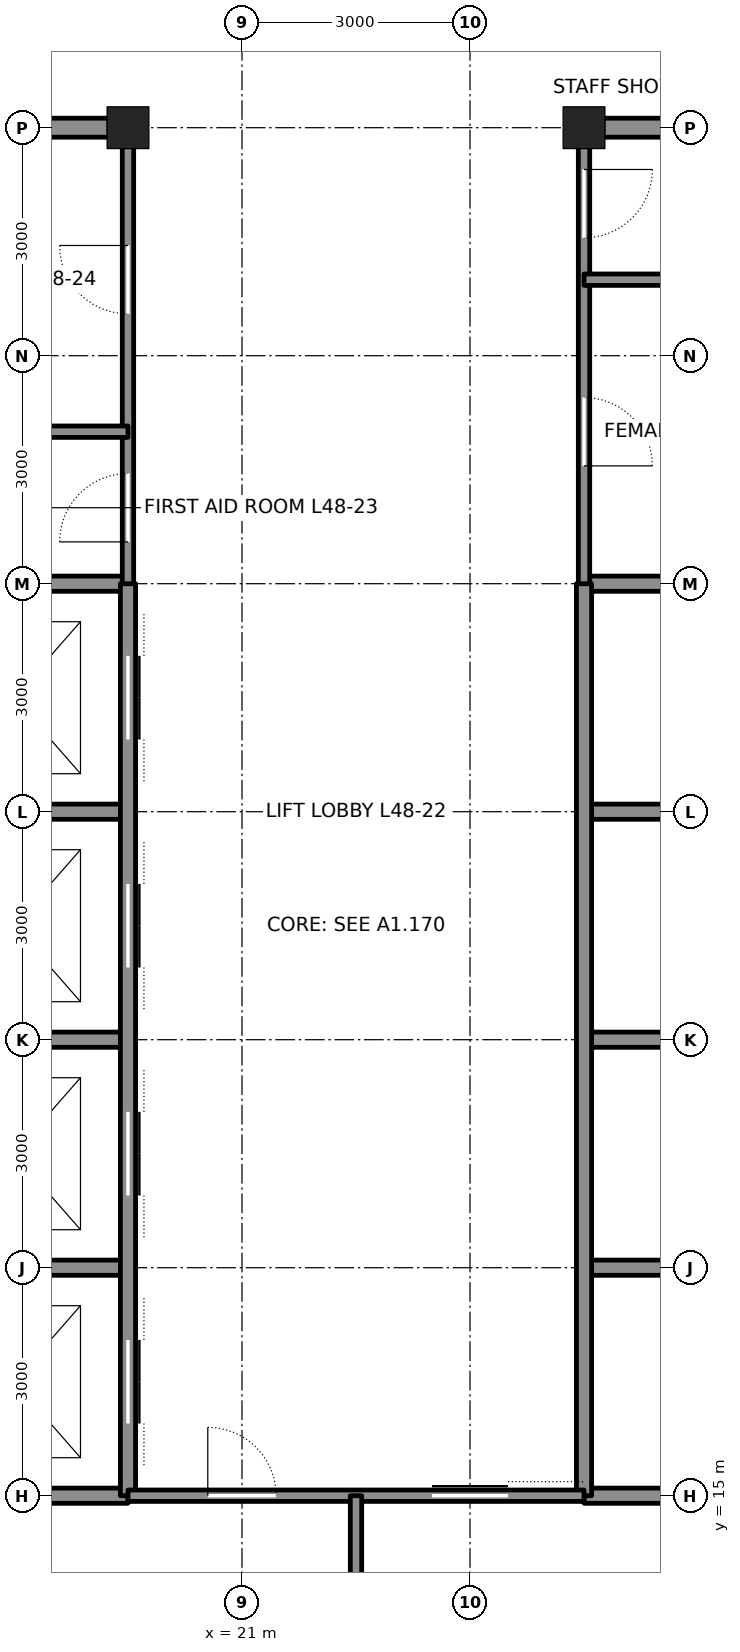
"""IFC4 building model, lengths in metres.
Left out: names, types, materials, properties, quantities, classifications, styles, units other than length and angle.
Written with IfcOpenShell. Run it as: python <this file> out.ifc"""

import sys

from ifc_helpers import new_model, si_unit, direction, frame, frame_2d, origin, origin_2d, place, context, subcontext, project, spatial, rectangle, hollow_rectangle, extrude, element, fill, save


model = new_model("IFC4")
c1 = context("Model", 3, precision=1e-05, world=origin(), true_north=direction((0.0, 1.0)))
c2 = subcontext(c1, "Body", "Model", "MODEL_VIEW")
j1 = project(units=[si_unit("LENGTHUNIT", "METRE"), si_unit("PLANEANGLEUNIT", "RADIAN")], contexts=[c1])
p1 = place(None, origin())
s1 = spatial("IfcSite", under=j1, at=p1, CompositionType="ELEMENT")
p2 = place(p1, origin())
s2 = spatial("IfcBuilding", under=s1, at=p2, CompositionType="ELEMENT")
p3 = place(p2, frame((0.0, 0.0, 218.1)))
s3 = spatial("IfcBuildingStorey", under=s2, at=p3, CompositionType="ELEMENT", Elevation=218.1)
for number, where, z_axis, x_axis in (
    (1, (19.5, 33.0, 0.0), (0.0, 0.0, 1.0), (1.0, 0.0, 0.0)),
    (2, (25.5, 33.0, 0.0), (0.0, 0.0, 1.0), (1.0, 0.0, 0.0)),
):
    element("IfcColumn", number, at=place(p3, frame(where, z_axis=z_axis, x_axis=x_axis)), inside=s3, PredefinedType="COLUMN", context=c2, shape_type="SweptSolid", body=[
        extrude(hollow_rectangle(XDim=0.55, YDim=0.55, WallThickness=0.045, at=origin_2d()), origin(), (0.0, 0.0, 1.0), 4.2),
    ])
for number, where, z_axis, x_axis in (
    (3, (12.0, 15.0, 0.0), (0.0, 0.0, 1.0), (1.0, 0.0, 0.0)),
    (4, (25.5, 15.0, 0.0), (0.0, 0.0, 1.0), (1.0, 0.0, 0.0)),
):
    element("IfcWall", number, at=place(p3, frame(where, z_axis=z_axis, x_axis=x_axis)), inside=s3, PredefinedType="SOLIDWALL", context=c2, shape_type="SweptSolid", body=[
        extrude(rectangle(XDim=7.5, YDim=0.2, at=frame_2d((3.75, 0.0))), origin(), (0.0, 0.0, 1.0), 4.04),
    ])
for number, where, z_axis, x_axis in (
    (5, (16.75, 24.0, 0.0), (0.0, 0.0, 1.0), (1.0, 0.0, 0.0)),
    (6, (25.5, 24.0, 0.0), (0.0, 0.0, 1.0), (1.0, 0.0, 0.0)),
):
    element("IfcWall", number, at=place(p3, frame(where, z_axis=z_axis, x_axis=x_axis)), inside=s3, PredefinedType="SOLIDWALL", context=c2, shape_type="SweptSolid", body=[
        extrude(rectangle(XDim=2.75, YDim=0.2, at=frame_2d((1.375, 0.0))), origin(), (0.0, 0.0, 1.0), 3.09),
    ])
p4 = place(p3, frame((12.0, 27.0, 0.0), z_axis=(0.0, 0.0, 1.0), x_axis=(1.0, 0.0, 0.0)))
e7 = element("IfcWall", 7, at=p4, inside=s3, PredefinedType="SOLIDWALL", context=c2, shape_type="SweptSolid", body=[
    extrude(rectangle(XDim=7.5, YDim=0.2, at=frame_2d((3.75, 0.0))), origin(), (0.0, 0.0, 1.0), 4.04),
])
p5 = place(p4, frame((1.65, 0.0, 0.0)))
e8 = element("IfcOpeningElement", 8, at=p5, cuts=e7, PredefinedType="OPENING", context=c2, shape_type="SweptSolid", body=[
    extrude(rectangle(XDim=1.2, YDim=2.1, at=frame_2d((0.6, 1.05))), frame((0.0, 0.11, 0.0), z_axis=(0.0, -1.0, 0.0), x_axis=(1.0, 0.0, 0.0)), (0.0, 0.0, 1.0), 0.22),
])
p6 = place(p3, frame((25.5, 27.0, 0.0), z_axis=(0.0, 0.0, 1.0), x_axis=(1.0, 0.0, 0.0)))
e9 = element("IfcWall", 9, at=p6, inside=s3, PredefinedType="SOLIDWALL", context=c2, shape_type="SweptSolid", body=[
    extrude(rectangle(XDim=3.0, YDim=0.2, at=frame_2d((1.5, 0.0))), origin(), (0.0, 0.0, 1.0), 4.04),
])
for number, where, z_axis, x_axis in (
    (10, (16.75, 33.0, 0.0), (0.0, 0.0, 1.0), (1.0, 0.0, 0.0)),
    (11, (25.75, 33.0, 0.0), (0.0, 0.0, 1.0), (1.0, 0.0, 0.0)),
):
    element("IfcWall", number, at=place(p3, frame(where, z_axis=z_axis, x_axis=x_axis)), inside=s3, PredefinedType="SOLIDWALL", context=c2, shape_type="SweptSolid", body=[
        extrude(rectangle(XDim=2.5, YDim=0.25, at=frame_2d((1.25, 0.0))), origin(), (0.0, 0.0, 1.0), 3.181),
    ])
p7 = place(p3, frame((16.5, 18.0, 0.0), z_axis=(0.0, 0.0, 1.0), x_axis=(1.0, 0.0, 0.0)))
e12 = element("IfcWall", 12, at=p7, inside=s3, PredefinedType="SOLIDWALL", context=c2, shape_type="SweptSolid", body=[
    extrude(rectangle(XDim=3.0, YDim=0.2, at=frame_2d((1.5, 0.0))), origin(), (0.0, 0.0, 1.0), 4.04),
])
p8 = place(p3, frame((25.5, 18.0, 0.0), z_axis=(0.0, 0.0, 1.0), x_axis=(1.0, 0.0, 0.0)))
e13 = element("IfcWall", 13, at=p8, inside=s3, PredefinedType="SOLIDWALL", context=c2, shape_type="SweptSolid", body=[
    extrude(rectangle(XDim=7.5, YDim=0.2, at=frame_2d((3.75, 0.0))), origin(), (0.0, 0.0, 1.0), 4.04),
])
p9 = place(p8, frame((4.65, 0.0, 0.0)))
e14 = element("IfcOpeningElement", 14, at=p9, cuts=e13, PredefinedType="OPENING", context=c2, shape_type="SweptSolid", body=[
    extrude(rectangle(XDim=1.2, YDim=2.1, at=frame_2d((0.6, 1.05))), frame((0.0, 0.11, 0.0), z_axis=(0.0, -1.0, 0.0), x_axis=(1.0, 0.0, 0.0)), (0.0, 0.0, 1.0), 0.22),
])
for number, where, z_axis, x_axis in (
    (15, (16.75, 21.0, 0.0), (0.0, 0.0, 1.0), (1.0, 0.0, 0.0)),
    (16, (25.5, 21.0, 0.0), (0.0, 0.0, 1.0), (1.0, 0.0, 0.0)),
):
    element("IfcWall", number, at=place(p3, frame(where, z_axis=z_axis, x_axis=x_axis)), inside=s3, PredefinedType="SOLIDWALL", context=c2, shape_type="SweptSolid", body=[
        extrude(rectangle(XDim=2.75, YDim=0.2, at=frame_2d((1.375, 0.0))), origin(), (0.0, 0.0, 1.0), 3.09),
    ])
p10 = place(p3, frame((19.5, 15.0, 0.0), z_axis=(0.0, 0.0, 1.0), x_axis=(0.0, 1.0, 0.0)))
e17 = element("IfcWall", 17, at=p10, inside=s3, PredefinedType="SOLIDWALL", context=c2, shape_type="SweptSolid", body=[
    extrude(rectangle(XDim=12.0, YDim=0.2, at=frame_2d((6.0, 0.0))), origin(), (0.0, 0.0, 1.0), 3.064),
])
p11 = place(p10, frame((0.95, 0.0, 0.0)))
e18 = element("IfcOpeningElement", 18, at=p11, cuts=e17, PredefinedType="OPENING", context=c2, shape_type="SweptSolid", body=[
    extrude(rectangle(XDim=1.1, YDim=2.1, at=frame_2d((0.55, 1.05))), frame((0.0, 0.11, 0.0), z_axis=(0.0, -1.0, 0.0), x_axis=(1.0, 0.0, 0.0)), (0.0, 0.0, 1.0), 0.22),
])
p12 = place(p10, frame((3.95, 0.0, 0.0)))
e19 = element("IfcOpeningElement", 19, at=p12, cuts=e17, PredefinedType="OPENING", context=c2, shape_type="SweptSolid", body=[
    extrude(rectangle(XDim=1.1, YDim=2.1, at=frame_2d((0.55, 1.05))), frame((0.0, 0.11, 0.0), z_axis=(0.0, -1.0, 0.0), x_axis=(1.0, 0.0, 0.0)), (0.0, 0.0, 1.0), 0.22),
])
p13 = place(p10, frame((6.95, 0.0, 0.0)))
e20 = element("IfcOpeningElement", 20, at=p13, cuts=e17, PredefinedType="OPENING", context=c2, shape_type="SweptSolid", body=[
    extrude(rectangle(XDim=1.1, YDim=2.1, at=frame_2d((0.55, 1.05))), frame((0.0, 0.11, 0.0), z_axis=(0.0, -1.0, 0.0), x_axis=(1.0, 0.0, 0.0)), (0.0, 0.0, 1.0), 0.22),
])
p14 = place(p10, frame((9.95, 0.0, 0.0)))
e21 = element("IfcOpeningElement", 21, at=p14, cuts=e17, PredefinedType="OPENING", context=c2, shape_type="SweptSolid", body=[
    extrude(rectangle(XDim=1.1, YDim=2.1, at=frame_2d((0.55, 1.05))), frame((0.0, 0.11, 0.0), z_axis=(0.0, -1.0, 0.0), x_axis=(1.0, 0.0, 0.0)), (0.0, 0.0, 1.0), 0.22),
])
p15 = place(p3, frame((19.5, 27.0, 0.0), z_axis=(0.0, 0.0, 1.0), x_axis=(0.0, 1.0, 0.0)))
e22 = element("IfcWall", 22, at=p15, inside=s3, PredefinedType="PARTITIONING", context=c2, shape_type="SweptSolid", body=[
    extrude(rectangle(XDim=5.75, YDim=0.15, at=frame_2d((2.875, 0.0))), origin(), (0.0, 0.0, 1.0), 3.064),
])
p16 = place(p15, frame((0.55, 0.0, 0.0)))
e23 = element("IfcOpeningElement", 23, at=p16, cuts=e22, PredefinedType="OPENING", context=c2, shape_type="SweptSolid", body=[
    extrude(rectangle(XDim=0.9, YDim=2.1, at=frame_2d((0.45, 1.05))), frame((0.0, 0.085, 0.0), z_axis=(0.0, -1.0, 0.0), x_axis=(1.0, 0.0, 0.0)), (0.0, 0.0, 1.0), 0.17),
])
p17 = place(p15, frame((3.55, 0.0, 0.0)))
e24 = element("IfcOpeningElement", 24, at=p17, cuts=e22, PredefinedType="OPENING", context=c2, shape_type="SweptSolid", body=[
    extrude(rectangle(XDim=0.9, YDim=2.1, at=frame_2d((0.45, 1.05))), frame((0.0, 0.085, 0.0), z_axis=(0.0, -1.0, 0.0), x_axis=(1.0, 0.0, 0.0)), (0.0, 0.0, 1.0), 0.17),
])
p18 = place(p3, frame((25.5, 15.0, 0.0), z_axis=(0.0, 0.0, 1.0), x_axis=(0.0, 1.0, 0.0)))
e25 = element("IfcWall", 25, at=p18, inside=s3, PredefinedType="SOLIDWALL", context=c2, shape_type="SweptSolid", body=[
    extrude(rectangle(XDim=12.0, YDim=0.2, at=frame_2d((6.0, 0.0))), origin(), (0.0, 0.0, 1.0), 3.064),
])
p19 = place(p3, frame((25.5, 27.0, 0.0), z_axis=(0.0, 0.0, 1.0), x_axis=(0.0, 1.0, 0.0)))
e26 = element("IfcWall", 26, at=p19, inside=s3, PredefinedType="PARTITIONING", context=c2, shape_type="SweptSolid", body=[
    extrude(rectangle(XDim=5.75, YDim=0.15, at=frame_2d((2.875, 0.0))), origin(), (0.0, 0.0, 1.0), 3.064),
])
p20 = place(p19, frame((1.55, 0.0, 0.0)))
e27 = element("IfcOpeningElement", 27, at=p20, cuts=e26, PredefinedType="OPENING", context=c2, shape_type="SweptSolid", body=[
    extrude(rectangle(XDim=0.9, YDim=2.1, at=frame_2d((0.45, 1.05))), frame((0.0, 0.085, 0.0), z_axis=(0.0, -1.0, 0.0), x_axis=(1.0, 0.0, 0.0)), (0.0, 0.0, 1.0), 0.17),
])
p21 = place(p19, frame((4.55, 0.0, 0.0)))
e28 = element("IfcOpeningElement", 28, at=p21, cuts=e26, PredefinedType="OPENING", context=c2, shape_type="SweptSolid", body=[
    extrude(rectangle(XDim=0.9, YDim=2.1, at=frame_2d((0.45, 1.05))), frame((0.0, 0.085, 0.0), z_axis=(0.0, -1.0, 0.0), x_axis=(1.0, 0.0, 0.0)), (0.0, 0.0, 1.0), 0.17),
])
p22 = place(p3, frame((19.5, 15.0, 0.0), z_axis=(0.0, 0.0, 1.0), x_axis=(1.0, 0.0, 0.0)))
e29 = element("IfcWall", 29, at=p22, inside=s3, PredefinedType="PARTITIONING", context=c2, shape_type="SweptSolid", body=[
    extrude(rectangle(XDim=6.0, YDim=0.15, at=frame_2d((3.0, 0.0))), origin(), (0.0, 0.0, 1.0), 4.04),
])
p23 = place(p22, frame((4.0, 0.0, 0.0)))
e30 = element("IfcOpeningElement", 30, at=p23, cuts=e29, PredefinedType="OPENING", context=c2, shape_type="SweptSolid", body=[
    extrude(rectangle(XDim=1.0, YDim=2.1, at=frame_2d((0.5, 1.05))), frame((0.0, 0.085, 0.0), z_axis=(0.0, -1.0, 0.0), x_axis=(1.0, 0.0, 0.0)), (0.0, 0.0, 1.0), 0.17),
])
p24 = place(p22, frame((1.05, 0.0, 0.0)))
e31 = element("IfcOpeningElement", 31, at=p24, cuts=e29, PredefinedType="OPENING", context=c2, shape_type="SweptSolid", body=[
    extrude(rectangle(XDim=0.9, YDim=2.1, at=frame_2d((0.45, 1.05))), frame((0.0, 0.085, 0.0), z_axis=(0.0, -1.0, 0.0), x_axis=(1.0, 0.0, 0.0)), (0.0, 0.0, 1.0), 0.17),
])
for number, where, z_axis, x_axis in (
    (32, (22.5, 15.0, 0.0), (0.0, 0.0, 1.0), (0.0, -1.0, 0.0)),
    (33, (16.5, 29.0, 0.0), (0.0, 0.0, 1.0), (1.0, 0.0, 0.0)),
    (34, (25.5, 31.0, 0.0), (0.0, 0.0, 1.0), (1.0, 0.0, 0.0)),
):
    element("IfcWall", number, at=place(p3, frame(where, z_axis=z_axis, x_axis=x_axis)), inside=s3, PredefinedType="PARTITIONING", context=c2, shape_type="SweptSolid", body=[
        extrude(rectangle(XDim=3.0, YDim=0.15, at=frame_2d((1.5, 0.0))), origin(), (0.0, 0.0, 1.0), 4.04),
    ])
p25 = place(p16, origin())
e35 = element("IfcDoor", 35, at=p25, inside=s3, OperationType="SINGLE_SWING_LEFT", PredefinedType="DOOR", context=c2, shape_type="SweptSolid", body=[
    extrude(rectangle(XDim=0.9, YDim=2.1, at=frame_2d((0.45, 1.05))), frame((0.0, 0.025, 0.0), z_axis=(0.0, -1.0, 0.0), x_axis=(1.0, 0.0, 0.0)), (0.0, 0.0, 1.0), 0.05),
])
fill(e23, e35)
p26 = place(p17, origin())
e36 = element("IfcDoor", 36, at=p26, inside=s3, OperationType="SINGLE_SWING_RIGHT", PredefinedType="DOOR", context=c2, shape_type="SweptSolid", body=[
    extrude(rectangle(XDim=0.9, YDim=2.1, at=frame_2d((0.45, 1.05))), frame((0.0, 0.025, 0.0), z_axis=(0.0, -1.0, 0.0), x_axis=(1.0, 0.0, 0.0)), (0.0, 0.0, 1.0), 0.05),
])
fill(e24, e36)
p27 = place(p20, frame((0.9, 0.0, 0.0), z_axis=(0.0, 0.0, 1.0), x_axis=(-1.0, 0.0, 0.0)))
e37 = element("IfcDoor", 37, at=p27, inside=s3, OperationType="SINGLE_SWING_RIGHT", PredefinedType="DOOR", context=c2, shape_type="SweptSolid", body=[
    extrude(rectangle(XDim=0.9, YDim=2.1, at=frame_2d((0.45, 1.05))), frame((0.0, 0.025, 0.0), z_axis=(0.0, -1.0, 0.0), x_axis=(1.0, 0.0, 0.0)), (0.0, 0.0, 1.0), 0.05),
])
fill(e27, e37)
p28 = place(p21, frame((0.9, 0.0, 0.0), z_axis=(0.0, 0.0, 1.0), x_axis=(-1.0, 0.0, 0.0)))
e38 = element("IfcDoor", 38, at=p28, inside=s3, OperationType="SINGLE_SWING_LEFT", PredefinedType="DOOR", context=c2, shape_type="SweptSolid", body=[
    extrude(rectangle(XDim=0.9, YDim=2.1, at=frame_2d((0.45, 1.05))), frame((0.0, 0.025, 0.0), z_axis=(0.0, -1.0, 0.0), x_axis=(1.0, 0.0, 0.0)), (0.0, 0.0, 1.0), 0.05),
])
fill(e28, e38)
p29 = place(p23, origin())
e39 = element("IfcDoor", 39, at=p29, inside=s3, OperationType="SLIDING_TO_LEFT", PredefinedType="DOOR", context=c2, shape_type="SweptSolid", body=[
    extrude(rectangle(XDim=1.0, YDim=2.1, at=frame_2d((0.5, 1.05))), frame((0.0, 0.025, 0.0), z_axis=(0.0, -1.0, 0.0), x_axis=(1.0, 0.0, 0.0)), (0.0, 0.0, 1.0), 0.05),
])
fill(e30, e39)
p30 = place(p24, origin())
e40 = element("IfcDoor", 40, at=p30, inside=s3, OperationType="SINGLE_SWING_LEFT", PredefinedType="DOOR", context=c2, shape_type="SweptSolid", body=[
    extrude(rectangle(XDim=0.9, YDim=2.1, at=frame_2d((0.45, 1.05))), frame((0.0, 0.025, 0.0), z_axis=(0.0, -1.0, 0.0), x_axis=(1.0, 0.0, 0.0)), (0.0, 0.0, 1.0), 0.05),
])
fill(e31, e40)
p31 = place(p11, origin())
e41 = element("IfcDoor", 41, at=p31, inside=s3, OperationType="DOUBLE_DOOR_SLIDING", PredefinedType="DOOR", context=c2, shape_type="SweptSolid", body=[
    extrude(rectangle(XDim=1.1, YDim=2.1, at=frame_2d((0.55, 1.05))), frame((0.0, 0.025, 0.0), z_axis=(0.0, -1.0, 0.0), x_axis=(1.0, 0.0, 0.0)), (0.0, 0.0, 1.0), 0.05),
])
fill(e18, e41)
p32 = place(p12, origin())
e42 = element("IfcDoor", 42, at=p32, inside=s3, OperationType="DOUBLE_DOOR_SLIDING", PredefinedType="DOOR", context=c2, shape_type="SweptSolid", body=[
    extrude(rectangle(XDim=1.1, YDim=2.1, at=frame_2d((0.55, 1.05))), frame((0.0, 0.025, 0.0), z_axis=(0.0, -1.0, 0.0), x_axis=(1.0, 0.0, 0.0)), (0.0, 0.0, 1.0), 0.05),
])
fill(e19, e42)
p33 = place(p13, origin())
e43 = element("IfcDoor", 43, at=p33, inside=s3, OperationType="DOUBLE_DOOR_SLIDING", PredefinedType="DOOR", context=c2, shape_type="SweptSolid", body=[
    extrude(rectangle(XDim=1.1, YDim=2.1, at=frame_2d((0.55, 1.05))), frame((0.0, 0.025, 0.0), z_axis=(0.0, -1.0, 0.0), x_axis=(1.0, 0.0, 0.0)), (0.0, 0.0, 1.0), 0.05),
])
fill(e20, e43)
p34 = place(p14, origin())
e44 = element("IfcDoor", 44, at=p34, inside=s3, OperationType="DOUBLE_DOOR_SLIDING", PredefinedType="DOOR", context=c2, shape_type="SweptSolid", body=[
    extrude(rectangle(XDim=1.1, YDim=2.1, at=frame_2d((0.55, 1.05))), frame((0.0, 0.025, 0.0), z_axis=(0.0, -1.0, 0.0), x_axis=(1.0, 0.0, 0.0)), (0.0, 0.0, 1.0), 0.05),
])
fill(e21, e44)
save(model, sys.argv[1])
